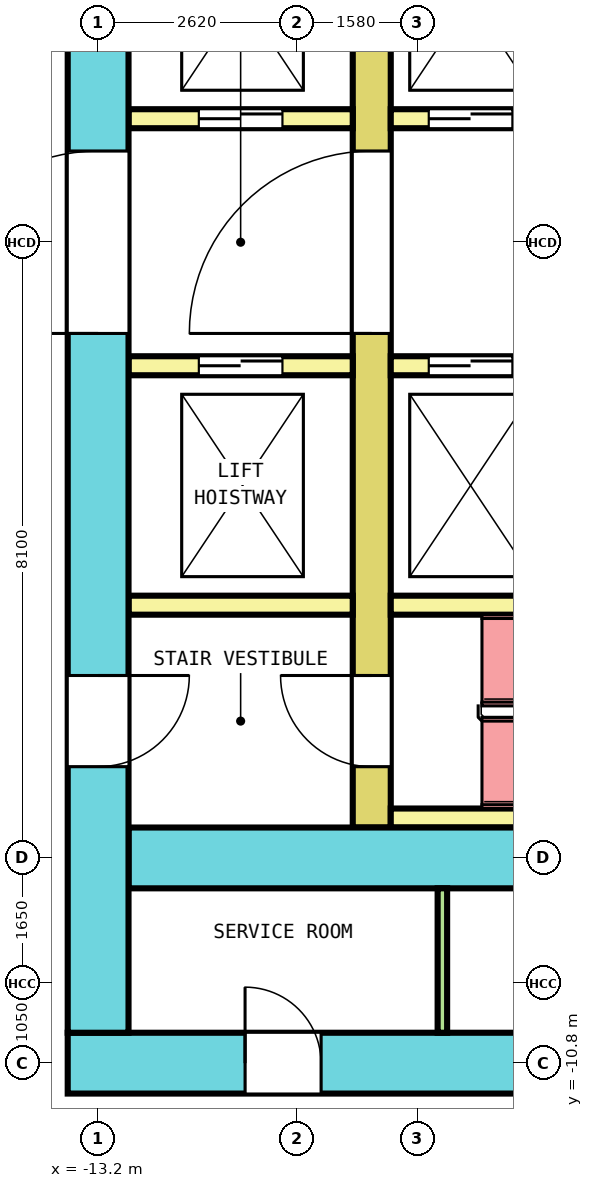
"""IFC4 building model, lengths in metres.
Left out: names, types, materials, properties, quantities, classifications, styles, units other than length and angle.
Written with IfcOpenShell. Run it as: python <this file> out.ifc"""

import sys

from ifc_helpers import new_model, si_unit, direction, frame, frame_2d, origin, place, context, subcontext, project, spatial, rectangle, extrude, element, fill, save


model = new_model("IFC4")
c1 = context("Model", 3, precision=1e-05, world=origin(), true_north=direction((0.0, 1.0)))
c2 = subcontext(c1, "Body", "Model", "MODEL_VIEW")
j1 = project(units=[si_unit("LENGTHUNIT", "METRE"), si_unit("PLANEANGLEUNIT", "RADIAN")], contexts=[c1])
p1 = place(None, origin())
s1 = spatial("IfcSite", under=j1, at=p1, CompositionType="ELEMENT")
p2 = place(p1, origin())
s2 = spatial("IfcBuilding", under=s1, at=p2, CompositionType="ELEMENT")
p3 = place(p2, frame((0.0, 0.0, 94.0)))
s3 = spatial("IfcBuildingStorey", under=s2, at=p3, CompositionType="ELEMENT", Elevation=94.0)
p4 = place(p3, frame((-13.6, -10.8, 0.0), z_axis=(0.0, 0.0, 1.0), x_axis=(1.0, 0.0, 0.0)))
e1 = element("IfcWall", 1, at=p4, inside=s3, PredefinedType="SHEAR", context=c2, shape_type="SweptSolid", body=[
    extrude(rectangle(XDim=27.2, YDim=0.8, at=frame_2d((13.6, 0.0))), origin(), (0.0, 0.0, 1.0), 4.1),
])
p5 = place(p4, frame((2.333, 0.0, 0.0)))
e2 = element("IfcOpeningElement", 2, at=p5, cuts=e1, PredefinedType="OPENING", context=c2, shape_type="SweptSolid", body=[
    extrude(rectangle(XDim=1.0, YDim=2.1, at=frame_2d((0.5, 1.05))), frame((0.0, 0.41, 0.0), z_axis=(0.0, -1.0, 0.0), x_axis=(1.0, 0.0, 0.0)), (0.0, 0.0, 1.0), 0.82),
])
p6 = place(p4, frame((6.494, 0.0, 0.0)))
e3 = element("IfcOpeningElement", 3, at=p6, cuts=e1, PredefinedType="OPENING", context=c2, shape_type="SweptSolid", body=[
    extrude(rectangle(XDim=1.0, YDim=2.1, at=frame_2d((0.5, 1.05))), frame((0.0, 0.41, 0.0), z_axis=(0.0, -1.0, 0.0), x_axis=(1.0, 0.0, 0.0)), (0.0, 0.0, 1.0), 0.82),
])
p7 = place(p4, frame((10.623, 0.0, 0.0)))
e4 = element("IfcOpeningElement", 4, at=p7, cuts=e1, PredefinedType="OPENING", context=c2, shape_type="SweptSolid", body=[
    extrude(rectangle(XDim=1.0, YDim=2.1, at=frame_2d((0.5, 1.05))), frame((0.0, 0.41, 0.0), z_axis=(0.0, -1.0, 0.0), x_axis=(1.0, 0.0, 0.0)), (0.0, 0.0, 1.0), 0.82),
])
p8 = place(p4, frame((19.16, 0.0, 0.0)))
e5 = element("IfcOpeningElement", 5, at=p8, cuts=e1, PredefinedType="OPENING", context=c2, shape_type="SweptSolid", body=[
    extrude(rectangle(XDim=1.0, YDim=2.1, at=frame_2d((0.5, 1.05))), frame((0.0, 0.41, 0.0), z_axis=(0.0, -1.0, 0.0), x_axis=(1.0, 0.0, 0.0)), (0.0, 0.0, 1.0), 0.82),
])
p9 = place(p4, frame((21.856, 0.0, 0.0)))
e6 = element("IfcOpeningElement", 6, at=p9, cuts=e1, PredefinedType="OPENING", context=c2, shape_type="SweptSolid", body=[
    extrude(rectangle(XDim=1.0, YDim=2.1, at=frame_2d((0.5, 1.05))), frame((0.0, 0.41, 0.0), z_axis=(0.0, -1.0, 0.0), x_axis=(1.0, 0.0, 0.0)), (0.0, 0.0, 1.0), 0.82),
])
p10 = place(p4, frame((24.583, 0.0, 0.0)))
e7 = element("IfcOpeningElement", 7, at=p10, cuts=e1, PredefinedType="OPENING", context=c2, shape_type="SweptSolid", body=[
    extrude(rectangle(XDim=1.0, YDim=2.1, at=frame_2d((0.5, 1.05))), frame((0.0, 0.41, 0.0), z_axis=(0.0, -1.0, 0.0), x_axis=(1.0, 0.0, 0.0)), (0.0, 0.0, 1.0), 0.82),
])
p11 = place(p4, frame((15.15, 0.0, 0.0)))
e8 = element("IfcOpeningElement", 8, at=p11, cuts=e1, PredefinedType="OPENING", context=c2, shape_type="SweptSolid", body=[
    extrude(rectangle(XDim=1.2, YDim=2.1, at=frame_2d((0.6, 1.05))), frame((0.0, 0.41, 0.0), z_axis=(0.0, -1.0, 0.0), x_axis=(1.0, 0.0, 0.0)), (0.0, 0.0, 1.0), 0.82),
])
p12 = place(p3, frame((-13.2, -10.4, 0.0), z_axis=(0.0, 0.0, 1.0), x_axis=(0.0, 1.0, 0.0)))
e9 = element("IfcWall", 9, at=p12, inside=s3, PredefinedType="SHEAR", context=c2, shape_type="SweptSolid", body=[
    extrude(rectangle(XDim=20.8, YDim=0.8, at=frame_2d((10.4, 0.0))), origin(), (0.0, 0.0, 1.0), 4.1),
])
p13 = place(p12, frame((9.2, 0.0, 0.0)))
e10 = element("IfcOpeningElement", 10, at=p13, cuts=e9, PredefinedType="OPENING", context=c2, shape_type="SweptSolid", body=[
    extrude(rectangle(XDim=2.4, YDim=2.1, at=frame_2d((1.2, 1.05))), frame((0.0, 0.41, 0.0), z_axis=(0.0, -1.0, 0.0), x_axis=(1.0, 0.0, 0.0)), (0.0, 0.0, 1.0), 0.82),
])
p14 = place(p12, frame((16.1, 0.0, 0.0)))
e11 = element("IfcOpeningElement", 11, at=p14, cuts=e9, PredefinedType="OPENING", context=c2, shape_type="SweptSolid", body=[
    extrude(rectangle(XDim=1.2, YDim=2.1, at=frame_2d((0.6, 1.05))), frame((0.0, 0.41, 0.0), z_axis=(0.0, -1.0, 0.0), x_axis=(1.0, 0.0, 0.0)), (0.0, 0.0, 1.0), 0.82),
])
p15 = place(p12, frame((3.5, 0.0, 0.0)))
e12 = element("IfcOpeningElement", 12, at=p15, cuts=e9, PredefinedType="OPENING", context=c2, shape_type="SweptSolid", body=[
    extrude(rectangle(XDim=1.2, YDim=2.1, at=frame_2d((0.6, 1.05))), frame((0.0, 0.41, 0.0), z_axis=(0.0, -1.0, 0.0), x_axis=(1.0, 0.0, 0.0)), (0.0, 0.0, 1.0), 0.82),
])
p16 = place(p3, frame((-12.8, -8.1, 0.0), z_axis=(0.0, 0.0, 1.0), x_axis=(1.0, 0.0, 0.0)))
e13 = element("IfcWall", 13, at=p16, inside=s3, PredefinedType="SHEAR", context=c2, shape_type="SweptSolid", body=[
    extrude(rectangle(XDim=25.6, YDim=0.8, at=frame_2d((12.8, 0.0))), origin(), (0.0, 0.0, 1.0), 4.1),
])
p17 = place(p16, frame((14.35, 0.0, 0.0)))
e14 = element("IfcOpeningElement", 14, at=p17, cuts=e13, PredefinedType="OPENING", context=c2, shape_type="SweptSolid", body=[
    extrude(rectangle(XDim=1.2, YDim=2.1, at=frame_2d((0.6, 1.05))), frame((0.0, 0.41, 0.0), z_axis=(0.0, -1.0, 0.0), x_axis=(1.0, 0.0, 0.0)), (0.0, 0.0, 1.0), 0.82),
])
p18 = place(p3, frame((-9.6, -7.7, 0.0), z_axis=(0.0, 0.0, 1.0), x_axis=(0.0, 1.0, 0.0)))
e15 = element("IfcWall", 15, at=p18, inside=s3, PredefinedType="SHEAR", context=c2, shape_type="SweptSolid", body=[
    extrude(rectangle(XDim=15.4, YDim=0.5, at=frame_2d((7.7, 0.0))), origin(), (0.0, 0.0, 1.0), 4.1),
])
p19 = place(p18, frame((6.5, 0.0, 0.0)))
e16 = element("IfcOpeningElement", 16, at=p19, cuts=e15, PredefinedType="OPENING", context=c2, shape_type="SweptSolid", body=[
    extrude(rectangle(XDim=2.4, YDim=2.1, at=frame_2d((1.2, 1.05))), frame((0.0, 0.26, 0.0), z_axis=(0.0, -1.0, 0.0), x_axis=(1.0, 0.0, 0.0)), (0.0, 0.0, 1.0), 0.52),
])
p20 = place(p18, frame((13.4, 0.0, 0.0)))
e17 = element("IfcOpeningElement", 17, at=p20, cuts=e15, PredefinedType="OPENING", context=c2, shape_type="SweptSolid", body=[
    extrude(rectangle(XDim=1.2, YDim=2.1, at=frame_2d((0.6, 1.05))), frame((0.0, 0.26, 0.0), z_axis=(0.0, -1.0, 0.0), x_axis=(1.0, 0.0, 0.0)), (0.0, 0.0, 1.0), 0.52),
])
p21 = place(p18, frame((0.8, 0.0, 0.0)))
e18 = element("IfcOpeningElement", 18, at=p21, cuts=e15, PredefinedType="OPENING", context=c2, shape_type="SweptSolid", body=[
    extrude(rectangle(XDim=1.2, YDim=2.1, at=frame_2d((0.6, 1.05))), frame((0.0, 0.26, 0.0), z_axis=(0.0, -1.0, 0.0), x_axis=(1.0, 0.0, 0.0)), (0.0, 0.0, 1.0), 0.52),
])
p22 = place(p3, frame((-12.8, 1.625, 0.0), z_axis=(0.0, 0.0, 1.0), x_axis=(1.0, 0.0, 0.0)))
e19 = element("IfcWall", 19, at=p22, inside=s3, PredefinedType="SOLIDWALL", context=c2, shape_type="SweptSolid", body=[
    extrude(rectangle(XDim=2.95, YDim=0.25, at=frame_2d((1.475, 0.0))), origin(), (0.0, 0.0, 1.0), 4.1),
])
p23 = place(p22, frame((0.925, 0.0, 0.0)))
e20 = element("IfcOpeningElement", 20, at=p23, cuts=e19, PredefinedType="OPENING", context=c2, shape_type="SweptSolid", body=[
    extrude(rectangle(XDim=1.1, YDim=2.1, at=frame_2d((0.55, 1.05))), frame((0.0, 0.135, 0.0), z_axis=(0.0, -1.0, 0.0), x_axis=(1.0, 0.0, 0.0)), (0.0, 0.0, 1.0), 0.27),
])
p24 = place(p3, frame((-9.35, 1.625, 0.0), z_axis=(0.0, 0.0, 1.0), x_axis=(1.0, 0.0, 0.0)))
e21 = element("IfcWall", 21, at=p24, inside=s3, PredefinedType="SOLIDWALL", context=c2, shape_type="SweptSolid", body=[
    extrude(rectangle(XDim=18.7, YDim=0.25, at=frame_2d((9.35, 0.0))), origin(), (0.0, 0.0, 1.0), 4.1),
])
p25 = place(p24, frame((0.5, 0.0, 0.0)))
e22 = element("IfcOpeningElement", 22, at=p25, cuts=e21, PredefinedType="OPENING", context=c2, shape_type="SweptSolid", body=[
    extrude(rectangle(XDim=1.1, YDim=2.1, at=frame_2d((0.55, 1.05))), frame((0.0, 0.135, 0.0), z_axis=(0.0, -1.0, 0.0), x_axis=(1.0, 0.0, 0.0)), (0.0, 0.0, 1.0), 0.27),
])
p26 = place(p24, frame((17.1, 0.0, 0.0)))
e23 = element("IfcOpeningElement", 23, at=p26, cuts=e21, PredefinedType="OPENING", context=c2, shape_type="SweptSolid", body=[
    extrude(rectangle(XDim=1.1, YDim=2.1, at=frame_2d((0.55, 1.05))), frame((0.0, 0.135, 0.0), z_axis=(0.0, -1.0, 0.0), x_axis=(1.0, 0.0, 0.0)), (0.0, 0.0, 1.0), 0.27),
])
p27 = place(p3, frame((-12.8, -1.625, 0.0), z_axis=(0.0, 0.0, 1.0), x_axis=(1.0, 0.0, 0.0)))
e24 = element("IfcWall", 24, at=p27, inside=s3, PredefinedType="SOLIDWALL", context=c2, shape_type="SweptSolid", body=[
    extrude(rectangle(XDim=2.95, YDim=0.25, at=frame_2d((1.475, 0.0))), origin(), (0.0, 0.0, 1.0), 4.1),
])
p28 = place(p27, frame((0.925, 0.0, 0.0)))
e25 = element("IfcOpeningElement", 25, at=p28, cuts=e24, PredefinedType="OPENING", context=c2, shape_type="SweptSolid", body=[
    extrude(rectangle(XDim=1.1, YDim=2.1, at=frame_2d((0.55, 1.05))), frame((0.0, 0.135, 0.0), z_axis=(0.0, -1.0, 0.0), x_axis=(1.0, 0.0, 0.0)), (0.0, 0.0, 1.0), 0.27),
])
p29 = place(p3, frame((-9.35, -1.625, 0.0), z_axis=(0.0, 0.0, 1.0), x_axis=(1.0, 0.0, 0.0)))
e26 = element("IfcWall", 26, at=p29, inside=s3, PredefinedType="SOLIDWALL", context=c2, shape_type="SweptSolid", body=[
    extrude(rectangle(XDim=18.7, YDim=0.25, at=frame_2d((9.35, 0.0))), origin(), (0.0, 0.0, 1.0), 4.1),
])
p30 = place(p29, frame((0.5, 0.0, 0.0)))
e27 = element("IfcOpeningElement", 27, at=p30, cuts=e26, PredefinedType="OPENING", context=c2, shape_type="SweptSolid", body=[
    extrude(rectangle(XDim=1.1, YDim=2.1, at=frame_2d((0.55, 1.05))), frame((0.0, 0.135, 0.0), z_axis=(0.0, -1.0, 0.0), x_axis=(1.0, 0.0, 0.0)), (0.0, 0.0, 1.0), 0.27),
])
p31 = place(p29, frame((17.1, 0.0, 0.0)))
e28 = element("IfcOpeningElement", 28, at=p31, cuts=e26, PredefinedType="OPENING", context=c2, shape_type="SweptSolid", body=[
    extrude(rectangle(XDim=1.1, YDim=2.1, at=frame_2d((0.55, 1.05))), frame((0.0, 0.135, 0.0), z_axis=(0.0, -1.0, 0.0), x_axis=(1.0, 0.0, 0.0)), (0.0, 0.0, 1.0), 0.27),
])
p32 = place(p3, frame((-12.8, -4.775, 0.0), z_axis=(0.0, 0.0, 1.0), x_axis=(1.0, 0.0, 0.0)))
e29 = element("IfcWall", 29, at=p32, inside=s3, PredefinedType="SOLIDWALL", context=c2, shape_type="SweptSolid", body=[
    extrude(rectangle(XDim=2.95, YDim=0.25, at=frame_2d((1.475, 0.0))), origin(), (0.0, 0.0, 1.0), 4.1),
])
p33 = place(p3, frame((-9.35, -4.775, 0.0), z_axis=(0.0, 0.0, 1.0), x_axis=(1.0, 0.0, 0.0)))
e30 = element("IfcWall", 30, at=p33, inside=s3, PredefinedType="SOLIDWALL", context=c2, shape_type="SweptSolid", body=[
    extrude(rectangle(XDim=18.7, YDim=0.25, at=frame_2d((9.35, 0.0))), origin(), (0.0, 0.0, 1.0), 4.1),
])
p34 = place(p3, frame((-9.35, -7.575, 0.0), z_axis=(0.0, 0.0, 1.0), x_axis=(1.0, 0.0, 0.0)))
e31 = element("IfcWall", 31, at=p34, inside=s3, PredefinedType="SOLIDWALL", context=c2, shape_type="SweptSolid", body=[
    extrude(rectangle(XDim=5.8, YDim=0.25, at=frame_2d((2.9, 0.0))), origin(), (0.0, 0.0, 1.0), 4.1),
])
p35 = place(p3, frame((-8.671, -10.4, 0.0), z_axis=(0.0, 0.0, 1.0), x_axis=(0.0, 1.0, 0.0)))
e32 = element("IfcWall", 32, at=p35, inside=s3, PredefinedType="PARTITIONING", context=c2, shape_type="SweptSolid", body=[
    extrude(rectangle(XDim=1.9, YDim=0.125, at=frame_2d((0.95, 0.0))), origin(), (0.0, 0.0, 1.0), 4.1),
])
p36 = place(p23, origin())
e33 = element("IfcDoor", 33, at=p36, inside=s3, OperationType="DOUBLE_DOOR_SLIDING", PredefinedType="DOOR", context=c2, shape_type="SweptSolid", body=[
    extrude(rectangle(XDim=1.1, YDim=2.1, at=frame_2d((0.55, 1.05))), frame((0.0, 0.075, 0.0), z_axis=(0.0, -1.0, 0.0), x_axis=(1.0, 0.0, 0.0)), (0.0, 0.0, 1.0), 0.15),
])
fill(e20, e33)
p37 = place(p25, origin())
e34 = element("IfcDoor", 34, at=p37, inside=s3, OperationType="DOUBLE_DOOR_SLIDING", PredefinedType="DOOR", context=c2, shape_type="SweptSolid", body=[
    extrude(rectangle(XDim=1.1, YDim=2.1, at=frame_2d((0.55, 1.05))), frame((0.0, 0.075, 0.0), z_axis=(0.0, -1.0, 0.0), x_axis=(1.0, 0.0, 0.0)), (0.0, 0.0, 1.0), 0.15),
])
fill(e22, e34)
p38 = place(p28, origin())
e35 = element("IfcDoor", 35, at=p38, inside=s3, OperationType="DOUBLE_DOOR_SLIDING", PredefinedType="DOOR", context=c2, shape_type="SweptSolid", body=[
    extrude(rectangle(XDim=1.1, YDim=2.1, at=frame_2d((0.55, 1.05))), frame((0.0, 0.075, 0.0), z_axis=(0.0, -1.0, 0.0), x_axis=(1.0, 0.0, 0.0)), (0.0, 0.0, 1.0), 0.15),
])
fill(e25, e35)
p39 = place(p30, origin())
e36 = element("IfcDoor", 36, at=p39, inside=s3, OperationType="DOUBLE_DOOR_SLIDING", PredefinedType="DOOR", context=c2, shape_type="SweptSolid", body=[
    extrude(rectangle(XDim=1.1, YDim=2.1, at=frame_2d((0.55, 1.05))), frame((0.0, 0.075, 0.0), z_axis=(0.0, -1.0, 0.0), x_axis=(1.0, 0.0, 0.0)), (0.0, 0.0, 1.0), 0.15),
])
fill(e27, e36)
p40 = place(p19, origin())
e37 = element("IfcDoor", 37, at=p40, inside=s3, OperationType="DOUBLE_DOOR_SINGLE_SWING", PredefinedType="DOOR", context=c2, shape_type="SweptSolid", body=[
    extrude(rectangle(XDim=2.4, YDim=2.1, at=frame_2d((1.2, 1.05))), frame((0.0, 0.2, 0.0), z_axis=(0.0, -1.0, 0.0), x_axis=(1.0, 0.0, 0.0)), (0.0, 0.0, 1.0), 0.4),
])
fill(e16, e37)
p41 = place(p13, origin())
e38 = element("IfcDoor", 38, at=p41, inside=s3, OperationType="DOUBLE_DOOR_SINGLE_SWING", PredefinedType="DOOR", context=c2, shape_type="SweptSolid", body=[
    extrude(rectangle(XDim=2.4, YDim=2.1, at=frame_2d((1.2, 1.05))), frame((0.0, 0.3, 0.0), z_axis=(0.0, -1.0, 0.0), x_axis=(1.0, 0.0, 0.0)), (0.0, 0.0, 1.0), 0.6),
])
fill(e10, e38)
p42 = place(p21, origin())
e39 = element("IfcDoor", 39, at=p42, inside=s3, OperationType="SINGLE_SWING_LEFT", PredefinedType="DOOR", context=c2, shape_type="SweptSolid", body=[
    extrude(rectangle(XDim=1.2, YDim=2.1, at=frame_2d((0.6, 1.05))), frame((0.0, 0.2, 0.0), z_axis=(0.0, -1.0, 0.0), x_axis=(1.0, 0.0, 0.0)), (0.0, 0.0, 1.0), 0.4),
])
fill(e18, e39)
p43 = place(p15, origin())
e40 = element("IfcDoor", 40, at=p43, inside=s3, OperationType="SINGLE_SWING_RIGHT", PredefinedType="DOOR", context=c2, shape_type="SweptSolid", body=[
    extrude(rectangle(XDim=1.2, YDim=2.1, at=frame_2d((0.6, 1.05))), frame((0.0, 0.3, 0.0), z_axis=(0.0, -1.0, 0.0), x_axis=(1.0, 0.0, 0.0)), (0.0, 0.0, 1.0), 0.6),
])
fill(e12, e40)
p44 = place(p5, origin())
e41 = element("IfcDoor", 41, at=p44, inside=s3, OperationType="SINGLE_SWING_LEFT", PredefinedType="DOOR", context=c2, shape_type="SweptSolid", body=[
    extrude(rectangle(XDim=1.0, YDim=2.1, at=frame_2d((0.5, 1.05))), frame((0.0, 0.3, 0.0), z_axis=(0.0, -1.0, 0.0), x_axis=(1.0, 0.0, 0.0)), (0.0, 0.0, 1.0), 0.6),
])
fill(e2, e41)
save(model, sys.argv[1])
